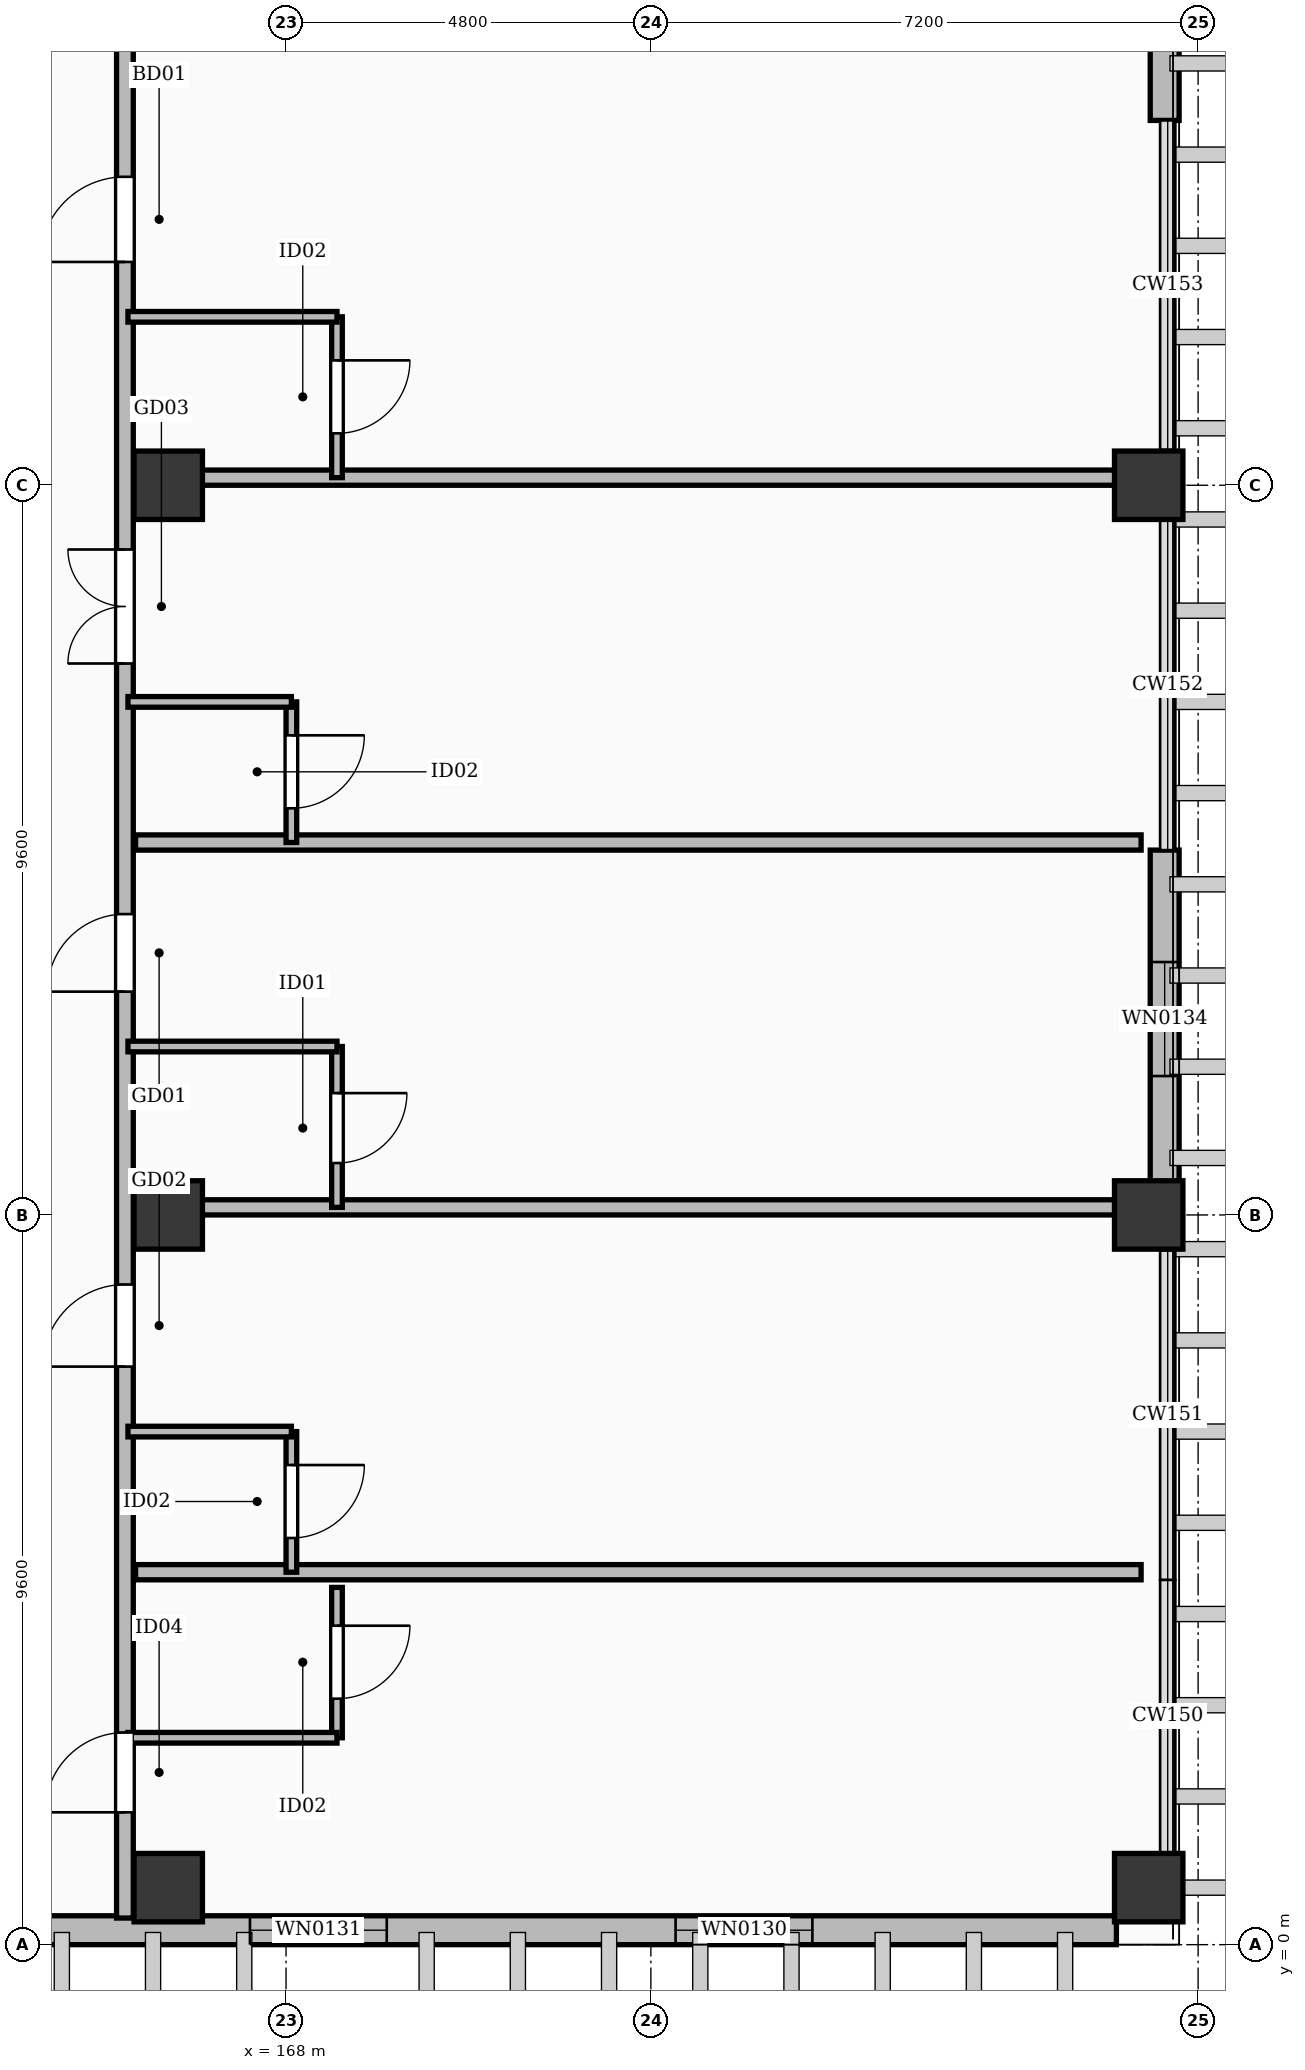
"""IFC4 building model, lengths in metres.
Left out: names, types, materials, properties, quantities, classifications, styles, units other than length and angle.
Written with IfcOpenShell. Run it as: python <this file> out.ifc"""

import sys

from ifc_helpers import new_model, si_unit, direction, frame, frame_2d, origin, origin_2d, place, context, subcontext, project, spatial, rectangle, extrude, element, fill, save


model = new_model("IFC4")
c1 = context("Model", 3, precision=1e-05, world=origin(), true_north=direction((0.0, 1.0)))
c2 = subcontext(c1, "Body", "Model", "MODEL_VIEW")
j1 = project(units=[si_unit("LENGTHUNIT", "METRE"), si_unit("PLANEANGLEUNIT", "RADIAN")], contexts=[c1])
p1 = place(None, origin())
s1 = spatial("IfcSite", under=j1, at=p1, CompositionType="ELEMENT")
p2 = place(p1, origin())
s2 = spatial("IfcBuilding", under=s1, at=p2, CompositionType="ELEMENT")
p3 = place(p2, frame((0.0, 0.0, 16.2)))
s3 = spatial("IfcBuildingStorey", under=s2, at=p3, CompositionType="ELEMENT", Elevation=16.2)
for number, where, z_axis, x_axis in (
    (1, (166.45, 0.75, 0.0), (0.0, 0.0, 1.0), (1.0, 0.0, 0.0)),
    (2, (166.45, 9.6, 0.0), (0.0, 0.0, 1.0), (1.0, 0.0, 0.0)),
    (3, (166.45, 19.2, 0.0), (0.0, 0.0, 1.0), (1.0, 0.0, 0.0)),
    (4, (179.35, 0.75, 0.0), (0.0, 0.0, 1.0), (1.0, 0.0, 0.0)),
    (5, (179.35, 9.6, 0.0), (0.0, 0.0, 1.0), (1.0, 0.0, 0.0)),
    (6, (179.35, 19.2, 0.0), (0.0, 0.0, 1.0), (1.0, 0.0, 0.0)),
):
    element("IfcColumn", number, at=place(p3, frame(where, z_axis=z_axis, x_axis=x_axis)), inside=s3, PredefinedType="COLUMN", context=c2, shape_type="SweptSolid", body=[
        extrude(rectangle(XDim=0.9, YDim=0.9, at=origin_2d()), origin(), (0.0, 0.0, 1.0), 4.8),
    ])
p4 = place(p3, frame((178.925, 0.19, 0.0), z_axis=(0.0, 0.0, 1.0), x_axis=(-1.0, 0.0, 0.0)))
e7 = element("IfcWall", 7, at=p4, inside=s3, PredefinedType="SOLIDWALL", context=c2, shape_type="SweptSolid", body=[
    extrude(rectangle(XDim=29.05, YDim=0.38, at=frame_2d((14.525, 0.0))), origin(), (0.0, 0.0, 1.0), 3.032),
])
p5 = place(p4, frame((4.0, 0.0, 0.55)))
e8 = element("IfcOpeningElement", 8, at=p5, cuts=e7, PredefinedType="OPENING", context=c2, shape_type="SweptSolid", body=[
    extrude(rectangle(XDim=1.8, YDim=1.76, at=frame_2d((0.9, 0.88))), frame((0.0, 0.202, 0.0), z_axis=(0.0, -1.0, 0.0), x_axis=(1.0, 0.0, 0.0)), (0.0, 0.0, 1.0), 0.404),
])
p6 = place(p4, frame((9.6, 0.0, 0.55)))
e9 = element("IfcOpeningElement", 9, at=p6, cuts=e7, PredefinedType="OPENING", context=c2, shape_type="SweptSolid", body=[
    extrude(rectangle(XDim=1.8, YDim=1.76, at=frame_2d((0.9, 0.88))), frame((0.0, 0.202, 0.0), z_axis=(0.0, -1.0, 0.0), x_axis=(1.0, 0.0, 0.0)), (0.0, 0.0, 1.0), 0.404),
])
p7 = place(p4, frame((20.8, 0.0, 0.55)))
e10 = element("IfcOpeningElement", 10, at=p7, cuts=e7, PredefinedType="OPENING", context=c2, shape_type="SweptSolid", body=[
    extrude(rectangle(XDim=1.8, YDim=1.76, at=frame_2d((0.9, 0.88))), frame((0.0, 0.202, 0.0), z_axis=(0.0, -1.0, 0.0), x_axis=(1.0, 0.0, 0.0)), (0.0, 0.0, 1.0), 0.404),
])
p8 = place(p4, frame((25.4, 0.0, 0.55)))
e11 = element("IfcOpeningElement", 11, at=p8, cuts=e7, PredefinedType="OPENING", context=c2, shape_type="SweptSolid", body=[
    extrude(rectangle(XDim=1.8, YDim=1.76, at=frame_2d((0.9, 0.88))), frame((0.0, 0.202, 0.0), z_axis=(0.0, -1.0, 0.0), x_axis=(1.0, 0.0, 0.0)), (0.0, 0.0, 1.0), 0.404),
])
p9 = place(p3, frame((179.56, 14.4, 0.0), z_axis=(0.0, 0.0, 1.0), x_axis=(0.0, -1.0, 0.0)))
e12 = element("IfcWall", 12, at=p9, inside=s3, PredefinedType="SOLIDWALL", context=c2, shape_type="SweptSolid", body=[
    extrude(rectangle(XDim=4.375, YDim=0.38, at=frame_2d((2.188, 0.0))), origin(), (0.0, 0.0, 1.0), 3.032),
])
p10 = place(p9, frame((1.472, 0.0, 0.55)))
e13 = element("IfcOpeningElement", 13, at=p10, cuts=e12, PredefinedType="OPENING", context=c2, shape_type="SweptSolid", body=[
    extrude(rectangle(XDim=1.5, YDim=1.74, at=frame_2d((0.75, 0.87))), frame((0.0, 0.202, 0.0), z_axis=(0.0, -1.0, 0.0), x_axis=(1.0, 0.0, 0.0)), (0.0, 0.0, 1.0), 0.404),
])
p11 = place(p3, frame((179.56, 28.375, 0.0), z_axis=(0.0, 0.0, 1.0), x_axis=(0.0, -1.0, 0.0)))
e14 = element("IfcWall", 14, at=p11, inside=s3, PredefinedType="SOLIDWALL", context=c2, shape_type="SweptSolid", body=[
    extrude(rectangle(XDim=4.375, YDim=0.38, at=frame_2d((2.188, 0.0))), origin(), (0.0, 0.0, 1.0), 3.032),
])
p12 = place(p3, frame((165.88, 0.35, 0.0), z_axis=(0.0, 0.0, 1.0), x_axis=(0.0, 1.0, 0.0)))
e15 = element("IfcWall", 15, at=p12, inside=s3, PredefinedType="PARTITIONING", context=c2, shape_type="SweptSolid", body=[
    extrude(rectangle(XDim=28.25, YDim=0.22, at=frame_2d((14.125, 0.0))), origin(), (0.0, 0.0, 1.0), 3.732),
])
p13 = place(p12, frame((1.391, 0.0, 0.0)))
e16 = element("IfcOpeningElement", 16, at=p13, cuts=e15, PredefinedType="OPENING", context=c2, shape_type="SweptSolid", body=[
    extrude(rectangle(XDim=1.05, YDim=2.18, at=frame_2d((0.525, 1.09))), frame((0.0, 0.122, 0.0), z_axis=(0.0, -1.0, 0.0), x_axis=(1.0, 0.0, 0.0)), (0.0, 0.0, 1.0), 0.244),
])
p14 = place(p12, frame((7.255, 0.0, 0.0)))
e17 = element("IfcOpeningElement", 17, at=p14, cuts=e15, PredefinedType="OPENING", context=c2, shape_type="SweptSolid", body=[
    extrude(rectangle(XDim=1.08, YDim=2.25, at=frame_2d((0.54, 1.125))), frame((0.0, 0.122, 0.0), z_axis=(0.0, -1.0, 0.0), x_axis=(1.0, 0.0, 0.0)), (0.0, 0.0, 1.0), 0.244),
])
p15 = place(p12, frame((12.188, 0.0, 0.0)))
e18 = element("IfcOpeningElement", 18, at=p15, cuts=e15, PredefinedType="OPENING", context=c2, shape_type="SweptSolid", body=[
    extrude(rectangle(XDim=1.02, YDim=2.2, at=frame_2d((0.51, 1.1))), frame((0.0, 0.122, 0.0), z_axis=(0.0, -1.0, 0.0), x_axis=(1.0, 0.0, 0.0)), (0.0, 0.0, 1.0), 0.244),
])
p16 = place(p12, frame((16.505, 0.0, 0.0)))
e19 = element("IfcOpeningElement", 19, at=p16, cuts=e15, PredefinedType="OPENING", context=c2, shape_type="SweptSolid", body=[
    extrude(rectangle(XDim=1.5, YDim=2.3, at=frame_2d((0.75, 1.15))), frame((0.0, 0.122, 0.0), z_axis=(0.0, -1.0, 0.0), x_axis=(1.0, 0.0, 0.0)), (0.0, 0.0, 1.0), 0.244),
])
p17 = place(p12, frame((21.788, 0.0, 0.0)))
e20 = element("IfcOpeningElement", 20, at=p17, cuts=e15, PredefinedType="OPENING", context=c2, shape_type="SweptSolid", body=[
    extrude(rectangle(XDim=1.12, YDim=2.15, at=frame_2d((0.56, 1.075))), frame((0.0, 0.122, 0.0), z_axis=(0.0, -1.0, 0.0), x_axis=(1.0, 0.0, 0.0)), (0.0, 0.0, 1.0), 0.244),
])
p18 = place(p3, frame((168.67, 2.722, 0.0), z_axis=(0.0, 0.0, 1.0), x_axis=(0.0, 1.0, 0.0)))
e21 = element("IfcWall", 21, at=p18, inside=s3, PredefinedType="PARTITIONING", context=c2, shape_type="SweptSolid", body=[
    extrude(rectangle(XDim=1.978, YDim=0.14, at=frame_2d((0.989, 0.0))), origin(), (0.0, 0.0, 1.0), 4.54),
])
p19 = place(p18, frame((0.514, 0.0, 0.0)))
e22 = element("IfcOpeningElement", 22, at=p19, cuts=e21, PredefinedType="OPENING", context=c2, shape_type="SweptSolid", body=[
    extrude(rectangle(XDim=0.96, YDim=2.12, at=frame_2d((0.48, 1.06))), frame((0.0, 0.082, 0.0), z_axis=(0.0, -1.0, 0.0), x_axis=(1.0, 0.0, 0.0)), (0.0, 0.0, 1.0), 0.164),
])
p20 = place(p3, frame((165.92, 2.722, 0.0), z_axis=(0.0, 0.0, 1.0), x_axis=(1.0, 0.0, 0.0)))
e23 = element("IfcWall", 23, at=p20, inside=s3, PredefinedType="PARTITIONING", context=c2, shape_type="SweptSolid", body=[
    extrude(rectangle(XDim=2.75, YDim=0.14, at=frame_2d((1.375, 0.0))), origin(), (0.0, 0.0, 1.0), 3.132),
])
p21 = place(p3, frame((166.02, 4.9, 0.0), z_axis=(0.0, 0.0, 1.0), x_axis=(1.0, 0.0, 0.0)))
e24 = element("IfcWall", 24, at=p21, inside=s3, PredefinedType="PARTITIONING", context=c2, shape_type="SweptSolid", body=[
    extrude(rectangle(XDim=13.23, YDim=0.2, at=frame_2d((6.615, 0.0))), origin(), (0.0, 0.0, 1.0), 3.032),
])
p22 = place(p3, frame((168.07, 4.9, 0.0), z_axis=(0.0, 0.0, 1.0), x_axis=(0.0, 1.0, 0.0)))
e25 = element("IfcWall", 25, at=p22, inside=s3, PredefinedType="PARTITIONING", context=c2, shape_type="SweptSolid", body=[
    extrude(rectangle(XDim=1.85, YDim=0.14, at=frame_2d((0.925, 0.0))), origin(), (0.0, 0.0, 1.0), 4.54),
])
p23 = place(p22, frame((0.45, 0.0, 0.0)))
e26 = element("IfcOpeningElement", 26, at=p23, cuts=e25, PredefinedType="OPENING", context=c2, shape_type="SweptSolid", body=[
    extrude(rectangle(XDim=0.96, YDim=2.12, at=frame_2d((0.48, 1.06))), frame((0.0, 0.082, 0.0), z_axis=(0.0, -1.0, 0.0), x_axis=(1.0, 0.0, 0.0)), (0.0, 0.0, 1.0), 0.164),
])
p24 = place(p3, frame((165.92, 6.75, 0.0), z_axis=(0.0, 0.0, 1.0), x_axis=(1.0, 0.0, 0.0)))
e27 = element("IfcWall", 27, at=p24, inside=s3, PredefinedType="PARTITIONING", context=c2, shape_type="SweptSolid", body=[
    extrude(rectangle(XDim=2.15, YDim=0.14, at=frame_2d((1.075, 0.0))), origin(), (0.0, 0.0, 1.0), 3.132),
])
p25 = place(p3, frame((166.02, 9.7, 0.0), z_axis=(0.0, 0.0, 1.0), x_axis=(1.0, 0.0, 0.0)))
e28 = element("IfcWall", 28, at=p25, inside=s3, PredefinedType="PARTITIONING", context=c2, shape_type="SweptSolid", body=[
    extrude(rectangle(XDim=13.23, YDim=0.2, at=frame_2d((6.615, 0.0))), origin(), (0.0, 0.0, 1.0), 3.032),
])
p26 = place(p3, frame((168.67, 9.7, 0.0), z_axis=(0.0, 0.0, 1.0), x_axis=(0.0, 1.0, 0.0)))
e29 = element("IfcWall", 29, at=p26, inside=s3, PredefinedType="PARTITIONING", context=c2, shape_type="SweptSolid", body=[
    extrude(rectangle(XDim=2.116, YDim=0.14, at=frame_2d((1.058, 0.0))), origin(), (0.0, 0.0, 1.0), 3.732),
])
p27 = place(p26, frame((0.583, 0.0, 0.0)))
e30 = element("IfcOpeningElement", 30, at=p27, cuts=e29, PredefinedType="OPENING", context=c2, shape_type="SweptSolid", body=[
    extrude(rectangle(XDim=0.92, YDim=2.1, at=frame_2d((0.46, 1.05))), frame((0.0, 0.082, 0.0), z_axis=(0.0, -1.0, 0.0), x_axis=(1.0, 0.0, 0.0)), (0.0, 0.0, 1.0), 0.164),
])
p28 = place(p3, frame((165.92, 11.816, 0.0), z_axis=(0.0, 0.0, 1.0), x_axis=(1.0, 0.0, 0.0)))
e31 = element("IfcWall", 31, at=p28, inside=s3, PredefinedType="PARTITIONING", context=c2, shape_type="SweptSolid", body=[
    extrude(rectangle(XDim=2.75, YDim=0.14, at=frame_2d((1.375, 0.0))), origin(), (0.0, 0.0, 1.0), 3.132),
])
p29 = place(p3, frame((166.02, 14.5, 0.0), z_axis=(0.0, 0.0, 1.0), x_axis=(1.0, 0.0, 0.0)))
e32 = element("IfcWall", 32, at=p29, inside=s3, PredefinedType="PARTITIONING", context=c2, shape_type="SweptSolid", body=[
    extrude(rectangle(XDim=13.23, YDim=0.2, at=frame_2d((6.615, 0.0))), origin(), (0.0, 0.0, 1.0), 3.032),
])
p30 = place(p3, frame((168.07, 14.5, 0.0), z_axis=(0.0, 0.0, 1.0), x_axis=(0.0, 1.0, 0.0)))
e33 = element("IfcWall", 33, at=p30, inside=s3, PredefinedType="PARTITIONING", context=c2, shape_type="SweptSolid", body=[
    extrude(rectangle(XDim=1.85, YDim=0.14, at=frame_2d((0.925, 0.0))), origin(), (0.0, 0.0, 1.0), 4.54),
])
p31 = place(p30, frame((0.45, 0.0, 0.0)))
e34 = element("IfcOpeningElement", 34, at=p31, cuts=e33, PredefinedType="OPENING", context=c2, shape_type="SweptSolid", body=[
    extrude(rectangle(XDim=0.96, YDim=2.12, at=frame_2d((0.48, 1.06))), frame((0.0, 0.082, 0.0), z_axis=(0.0, -1.0, 0.0), x_axis=(1.0, 0.0, 0.0)), (0.0, 0.0, 1.0), 0.164),
])
p32 = place(p3, frame((165.92, 16.35, 0.0), z_axis=(0.0, 0.0, 1.0), x_axis=(1.0, 0.0, 0.0)))
e35 = element("IfcWall", 35, at=p32, inside=s3, PredefinedType="PARTITIONING", context=c2, shape_type="SweptSolid", body=[
    extrude(rectangle(XDim=2.15, YDim=0.14, at=frame_2d((1.075, 0.0))), origin(), (0.0, 0.0, 1.0), 3.132),
])
p33 = place(p3, frame((166.02, 19.3, 0.0), z_axis=(0.0, 0.0, 1.0), x_axis=(1.0, 0.0, 0.0)))
e36 = element("IfcWall", 36, at=p33, inside=s3, PredefinedType="PARTITIONING", context=c2, shape_type="SweptSolid", body=[
    extrude(rectangle(XDim=13.23, YDim=0.2, at=frame_2d((6.615, 0.0))), origin(), (0.0, 0.0, 1.0), 3.032),
])
p34 = place(p3, frame((168.67, 19.3, 0.0), z_axis=(0.0, 0.0, 1.0), x_axis=(0.0, 1.0, 0.0)))
e37 = element("IfcWall", 37, at=p34, inside=s3, PredefinedType="PARTITIONING", context=c2, shape_type="SweptSolid", body=[
    extrude(rectangle(XDim=2.116, YDim=0.14, at=frame_2d((1.058, 0.0))), origin(), (0.0, 0.0, 1.0), 3.732),
])
p35 = place(p34, frame((0.583, 0.0, 0.0)))
e38 = element("IfcOpeningElement", 38, at=p35, cuts=e37, PredefinedType="OPENING", context=c2, shape_type="SweptSolid", body=[
    extrude(rectangle(XDim=0.96, YDim=2.12, at=frame_2d((0.48, 1.06))), frame((0.0, 0.082, 0.0), z_axis=(0.0, -1.0, 0.0), x_axis=(1.0, 0.0, 0.0)), (0.0, 0.0, 1.0), 0.164),
])
p36 = place(p3, frame((165.92, 21.416, 0.0), z_axis=(0.0, 0.0, 1.0), x_axis=(1.0, 0.0, 0.0)))
e39 = element("IfcWall", 39, at=p36, inside=s3, PredefinedType="PARTITIONING", context=c2, shape_type="SweptSolid", body=[
    extrude(rectangle(XDim=2.75, YDim=0.14, at=frame_2d((1.375, 0.0))), origin(), (0.0, 0.0, 1.0), 3.132),
])
p37 = place(p5, origin())
e40 = element("IfcWindow", 40, at=p37, inside=s3, PartitioningType="SINGLE_PANEL", PredefinedType="WINDOW", context=c2, shape_type="SweptSolid", body=[
    extrude(rectangle(XDim=1.8, YDim=1.76, at=frame_2d((0.9, 0.88))), frame((0.0, 0.03, 0.0), z_axis=(0.0, -1.0, 0.0), x_axis=(1.0, 0.0, 0.0)), (0.0, 0.0, 1.0), 0.06),
])
fill(e8, e40)
p38 = place(p6, origin())
e41 = element("IfcWindow", 41, at=p38, inside=s3, PartitioningType="SINGLE_PANEL", PredefinedType="WINDOW", context=c2, shape_type="SweptSolid", body=[
    extrude(rectangle(XDim=1.8, YDim=1.76, at=frame_2d((0.9, 0.88))), frame((0.0, 0.03, 0.0), z_axis=(0.0, -1.0, 0.0), x_axis=(1.0, 0.0, 0.0)), (0.0, 0.0, 1.0), 0.06),
])
fill(e9, e41)
p39 = place(p10, origin())
e42 = element("IfcWindow", 42, at=p39, inside=s3, PartitioningType="SINGLE_PANEL", PredefinedType="WINDOW", context=c2, shape_type="SweptSolid", body=[
    extrude(rectangle(XDim=1.5, YDim=1.74, at=frame_2d((0.75, 0.87))), frame((0.0, 0.03, 0.0), z_axis=(0.0, -1.0, 0.0), x_axis=(1.0, 0.0, 0.0)), (0.0, 0.0, 1.0), 0.06),
])
fill(e13, e42)
p40 = place(p13, origin())
e43 = element("IfcDoor", 43, at=p40, inside=s3, OperationType="SINGLE_SWING_LEFT", PredefinedType="DOOR", context=c2, shape_type="SweptSolid", body=[
    extrude(rectangle(XDim=1.05, YDim=2.18, at=frame_2d((0.525, 1.09))), frame((0.0, 0.025, 0.0), z_axis=(0.0, -1.0, 0.0), x_axis=(1.0, 0.0, 0.0)), (0.0, 0.0, 1.0), 0.05),
])
fill(e16, e43)
p41 = place(p19, frame((0.96, 0.0, 0.0), z_axis=(0.0, 0.0, 1.0), x_axis=(-1.0, 0.0, 0.0)))
e44 = element("IfcDoor", 44, at=p41, inside=s3, OperationType="SINGLE_SWING_RIGHT", PredefinedType="DOOR", context=c2, shape_type="SweptSolid", body=[
    extrude(rectangle(XDim=0.96, YDim=2.12, at=frame_2d((0.48, 1.06))), frame((0.0, 0.025, 0.0), z_axis=(0.0, -1.0, 0.0), x_axis=(1.0, 0.0, 0.0)), (0.0, 0.0, 1.0), 0.05),
])
fill(e22, e44)
p42 = place(p14, origin())
e45 = element("IfcDoor", 45, at=p42, inside=s3, OperationType="SINGLE_SWING_LEFT", PredefinedType="DOOR", context=c2, shape_type="SweptSolid", body=[
    extrude(rectangle(XDim=1.08, YDim=2.25, at=frame_2d((0.54, 1.125))), frame((0.0, 0.025, 0.0), z_axis=(0.0, -1.0, 0.0), x_axis=(1.0, 0.0, 0.0)), (0.0, 0.0, 1.0), 0.05),
])
fill(e17, e45)
p43 = place(p23, frame((0.96, 0.0, 0.0), z_axis=(0.0, 0.0, 1.0), x_axis=(-1.0, 0.0, 0.0)))
e46 = element("IfcDoor", 46, at=p43, inside=s3, OperationType="SINGLE_SWING_RIGHT", PredefinedType="DOOR", context=c2, shape_type="SweptSolid", body=[
    extrude(rectangle(XDim=0.96, YDim=2.12, at=frame_2d((0.48, 1.06))), frame((0.0, 0.025, 0.0), z_axis=(0.0, -1.0, 0.0), x_axis=(1.0, 0.0, 0.0)), (0.0, 0.0, 1.0), 0.05),
])
fill(e26, e46)
p44 = place(p15, origin())
e47 = element("IfcDoor", 47, at=p44, inside=s3, OperationType="SINGLE_SWING_LEFT", PredefinedType="DOOR", context=c2, shape_type="SweptSolid", body=[
    extrude(rectangle(XDim=1.02, YDim=2.2, at=frame_2d((0.51, 1.1))), frame((0.0, 0.025, 0.0), z_axis=(0.0, -1.0, 0.0), x_axis=(1.0, 0.0, 0.0)), (0.0, 0.0, 1.0), 0.05),
])
fill(e18, e47)
p45 = place(p27, frame((0.92, 0.0, 0.0), z_axis=(0.0, 0.0, 1.0), x_axis=(-1.0, 0.0, 0.0)))
e48 = element("IfcDoor", 48, at=p45, inside=s3, OperationType="SINGLE_SWING_RIGHT", PredefinedType="DOOR", context=c2, shape_type="SweptSolid", body=[
    extrude(rectangle(XDim=0.92, YDim=2.1, at=frame_2d((0.46, 1.05))), frame((0.0, 0.025, 0.0), z_axis=(0.0, -1.0, 0.0), x_axis=(1.0, 0.0, 0.0)), (0.0, 0.0, 1.0), 0.05),
])
fill(e30, e48)
p46 = place(p16, origin())
e49 = element("IfcDoor", 49, at=p46, inside=s3, OperationType="DOUBLE_DOOR_SINGLE_SWING", PredefinedType="DOOR", context=c2, shape_type="SweptSolid", body=[
    extrude(rectangle(XDim=1.5, YDim=2.3, at=frame_2d((0.75, 1.15))), frame((0.0, 0.025, 0.0), z_axis=(0.0, -1.0, 0.0), x_axis=(1.0, 0.0, 0.0)), (0.0, 0.0, 1.0), 0.05),
])
fill(e19, e49)
p47 = place(p31, frame((0.96, 0.0, 0.0), z_axis=(0.0, 0.0, 1.0), x_axis=(-1.0, 0.0, 0.0)))
e50 = element("IfcDoor", 50, at=p47, inside=s3, OperationType="SINGLE_SWING_RIGHT", PredefinedType="DOOR", context=c2, shape_type="SweptSolid", body=[
    extrude(rectangle(XDim=0.96, YDim=2.12, at=frame_2d((0.48, 1.06))), frame((0.0, 0.025, 0.0), z_axis=(0.0, -1.0, 0.0), x_axis=(1.0, 0.0, 0.0)), (0.0, 0.0, 1.0), 0.05),
])
fill(e34, e50)
p48 = place(p17, origin())
e51 = element("IfcDoor", 51, at=p48, inside=s3, OperationType="SINGLE_SWING_LEFT", PredefinedType="DOOR", context=c2, shape_type="SweptSolid", body=[
    extrude(rectangle(XDim=1.12, YDim=2.15, at=frame_2d((0.56, 1.075))), frame((0.0, 0.025, 0.0), z_axis=(0.0, -1.0, 0.0), x_axis=(1.0, 0.0, 0.0)), (0.0, 0.0, 1.0), 0.05),
])
fill(e20, e51)
p49 = place(p35, frame((0.96, 0.0, 0.0), z_axis=(0.0, 0.0, 1.0), x_axis=(-1.0, 0.0, 0.0)))
e52 = element("IfcDoor", 52, at=p49, inside=s3, OperationType="SINGLE_SWING_RIGHT", PredefinedType="DOOR", context=c2, shape_type="SweptSolid", body=[
    extrude(rectangle(XDim=0.96, YDim=2.12, at=frame_2d((0.48, 1.06))), frame((0.0, 0.025, 0.0), z_axis=(0.0, -1.0, 0.0), x_axis=(1.0, 0.0, 0.0)), (0.0, 0.0, 1.0), 0.05),
])
fill(e38, e52)
save(model, sys.argv[1])
